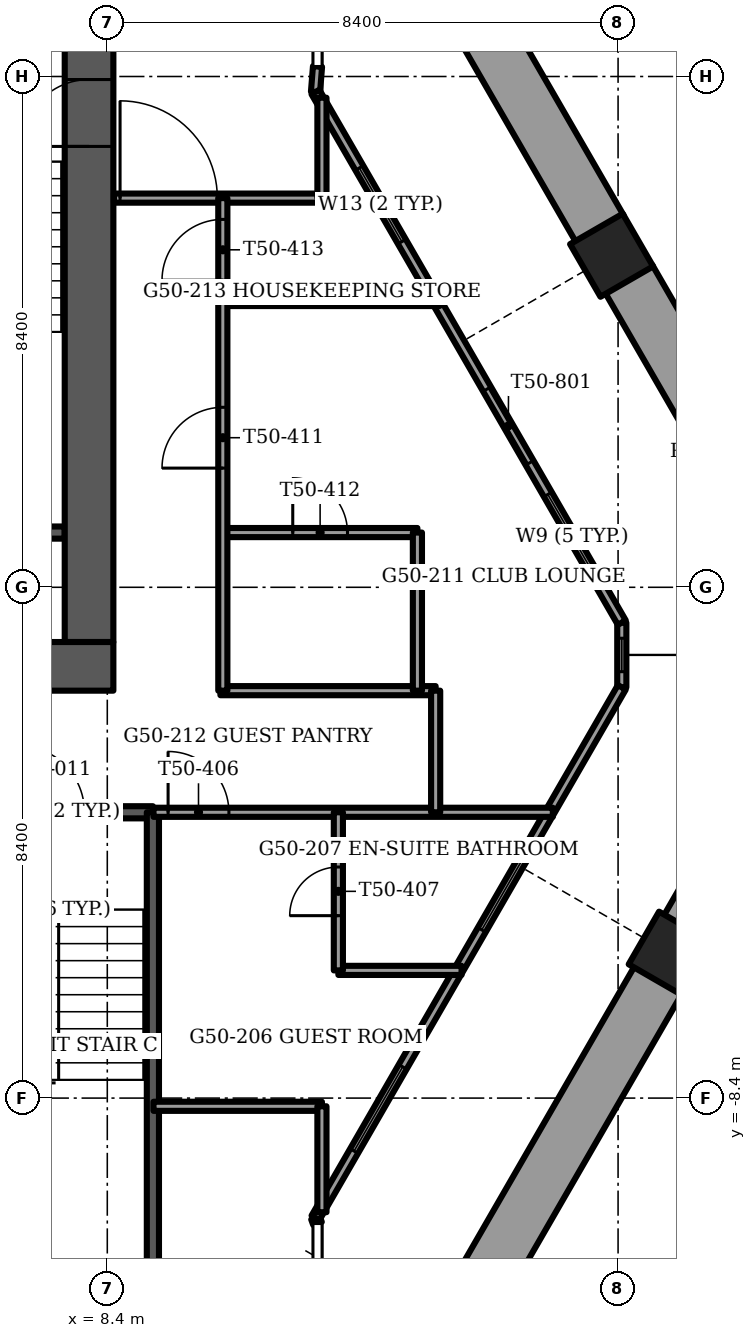
"""IFC4 building model, lengths in metres.
Left out: names, types, materials, properties, quantities, classifications, styles, units other than length and angle.
Written with IfcOpenShell. Run it as: python <this file> out.ifc"""

import sys

from ifc_helpers import new_model, si_unit, direction, frame, frame_2d, origin, origin_2d, place, context, subcontext, project, spatial, rectangle, extrude, element, fill, save


model = new_model("IFC4")
c1 = context("Model", 3, precision=1e-05, world=origin(), true_north=direction((0.0, 1.0)))
c2 = subcontext(c1, "Body", "Model", "MODEL_VIEW")
j1 = project(units=[si_unit("LENGTHUNIT", "METRE"), si_unit("PLANEANGLEUNIT", "RADIAN")], contexts=[c1])
p1 = place(None, origin())
s1 = spatial("IfcSite", under=j1, at=p1, CompositionType="ELEMENT")
p2 = place(p1, origin())
s2 = spatial("IfcBuilding", under=s1, at=p2, CompositionType="ELEMENT")
p3 = place(p2, frame((0.0, 0.0, 202.0)))
s3 = spatial("IfcBuildingStorey", under=s2, at=p3, CompositionType="ELEMENT", Elevation=202.0)
for number, where, z_axis, x_axis in (
    (1, (17.657, -6.017, -1.2), (0.0, 0.0, 1.0), (-0.5, -0.866, 0.0)),
    (2, (16.694, 5.46, -1.2), (0.0, 0.0, 1.0), (0.5, -0.866, 0.0)),
):
    element("IfcColumn", number, at=place(p3, frame(where, z_axis=z_axis, x_axis=x_axis)), inside=s3, PredefinedType="COLUMN", context=c2, shape_type="SweptSolid", body=[
        extrude(rectangle(XDim=1.0, YDim=1.0, at=origin_2d()), origin(), (0.0, 0.0, 1.0), 3.75),
    ])
p4 = place(p3, frame((-8.5, -1.3, -0.3), z_axis=(0.0, 0.0, 1.0), x_axis=(1.0, 0.0, 0.0)))
e3 = element("IfcWall", 3, at=p4, inside=s3, PredefinedType="SHEAR", context=c2, shape_type="SweptSolid", body=[
    extrude(rectangle(XDim=17.0, YDim=0.8, at=frame_2d((8.5, 0.0))), origin(), (0.0, 0.0, 1.0), 3.75),
])
p5 = place(p4, frame((7.7, 0.0, 0.0)))
e4 = element("IfcOpeningElement", 4, at=p5, cuts=e3, PredefinedType="OPENING", context=c2, shape_type="SweptSolid", body=[
    extrude(rectangle(XDim=1.6, YDim=2.1, at=frame_2d((0.8, 1.05))), frame((0.0, 0.4, 0.0), z_axis=(0.0, -1.0, 0.0), x_axis=(1.0, 0.0, 0.0)), (0.0, 0.0, 1.0), 0.8),
])
p6 = place(p3, frame((8.1, -0.9, -0.3), z_axis=(0.0, 0.0, 1.0), x_axis=(0.0, 1.0, 0.0)))
e5 = element("IfcWall", 5, at=p6, inside=s3, PredefinedType="SHEAR", context=c2, shape_type="SweptSolid", body=[
    extrude(rectangle(XDim=9.8, YDim=0.8, at=frame_2d((4.9, 0.0))), origin(), (0.0, 0.0, 1.0), 3.75),
])
p7 = place(p6, frame((8.15, 0.0, 0.0)))
e6 = element("IfcOpeningElement", 6, at=p7, cuts=e5, PredefinedType="OPENING", context=c2, shape_type="SweptSolid", body=[
    extrude(rectangle(XDim=1.1, YDim=2.1, at=frame_2d((0.55, 1.05))), frame((0.0, 0.4, 0.0), z_axis=(0.0, -1.0, 0.0), x_axis=(1.0, 0.0, 0.0)), (0.0, 0.0, 1.0), 0.8),
])
p8 = place(p3, frame((14.317, -11.901, 0.0), z_axis=(0.0, 0.0, 1.0), x_axis=(0.500013351051, 0.866017695414, 0.0)))
e7 = element("IfcWall", 7, at=p8, inside=s3, PredefinedType="PARAPET", context=c2, shape_type="SweptSolid", body=[
    extrude(rectangle(XDim=6.296, YDim=0.9, at=frame_2d((3.148, 0.0))), origin(), (0.0, 0.0, 1.0), 1.1),
])
p9 = place(p3, frame((17.936, -5.635, 0.0), z_axis=(0.0, 0.0, 1.0), x_axis=(0.500028081597, 0.86600919026, 0.0)))
e8 = element("IfcWall", 8, at=p9, inside=s3, PredefinedType="PARAPET", context=c2, shape_type="SweptSolid", body=[
    extrude(rectangle(XDim=4.679, YDim=0.9, at=frame_2d((2.339, 0.0))), origin(), (0.0, 0.0, 1.0), 1.1),
])
p10 = place(p3, frame((20.275, -0.643, 0.0), z_axis=(0.0, 0.0, 1.0), x_axis=(-0.500010360262, 0.866019422202, 0.0)))
e9 = element("IfcWall", 9, at=p10, inside=s3, PredefinedType="PARAPET", context=c2, shape_type="SweptSolid", body=[
    extrude(rectangle(XDim=6.606, YDim=0.9, at=frame_2d((3.303, 0.0))), origin(), (0.0, 0.0, 1.0), 1.1),
])
p11 = place(p3, frame((16.502, 5.892, 0.0), z_axis=(0.0, 0.0, 1.0), x_axis=(-0.500013351051, 0.866017695414, 0.0)))
e10 = element("IfcWall", 10, at=p11, inside=s3, PredefinedType="PARAPET", context=c2, shape_type="SweptSolid", body=[
    extrude(rectangle(XDim=6.296, YDim=0.9, at=frame_2d((3.148, 0.0))), origin(), (0.0, 0.0, 1.0), 1.1),
])
p12 = place(p3, frame((11.824, -10.37, 0.0), z_axis=(0.0, 0.0, 1.0), x_axis=(0.499993749393, 0.866029012544, 0.0)))
e11 = element("IfcWall", 11, at=p12, inside=s3, PredefinedType="SOLIDWALL", context=c2, shape_type="SweptSolid", body=[
    extrude(rectangle(XDim=10.075, YDim=0.15, at=frame_2d((5.038, 0.0))), origin(), (0.0, 0.0, 1.0), 3.45),
])
p13 = place(p12, frame((1.269, 0.0, 0.15)))
e12 = element("IfcOpeningElement", 12, at=p13, cuts=e11, PredefinedType="OPENING", context=c2, shape_type="SweptSolid", body=[
    extrude(rectangle(XDim=1.6, YDim=2.2, at=frame_2d((0.8, 1.1))), frame((0.0, 0.075, 0.0), z_axis=(0.0, -1.0, 0.0), x_axis=(1.0, 0.0, 0.0)), (0.0, 0.0, 1.0), 0.15),
])
p14 = place(p12, frame((5.469, 0.0, 0.15)))
e13 = element("IfcOpeningElement", 13, at=p14, cuts=e11, PredefinedType="OPENING", context=c2, shape_type="SweptSolid", body=[
    extrude(rectangle(XDim=1.6, YDim=2.2, at=frame_2d((0.8, 1.1))), frame((0.0, 0.075, 0.0), z_axis=(0.0, -1.0, 0.0), x_axis=(1.0, 0.0, 0.0)), (0.0, 0.0, 1.0), 0.15),
])
p15 = place(p3, frame((16.861, -0.58, 0.0), z_axis=(0.0, 0.0, 1.0), x_axis=(-0.499993749393, 0.866029012544, 0.0)))
e14 = element("IfcWall", 14, at=p15, inside=s3, PredefinedType="SOLIDWALL", context=c2, shape_type="SweptSolid", body=[
    extrude(rectangle(XDim=10.075, YDim=0.15, at=frame_2d((5.038, 0.0))), origin(), (0.0, 0.0, 1.0), 3.45),
])
p16 = place(p15, frame((0.833, 0.0, 0.15)))
e15 = element("IfcOpeningElement", 15, at=p16, cuts=e14, PredefinedType="OPENING", context=c2, shape_type="SweptSolid", body=[
    extrude(rectangle(XDim=1.6, YDim=2.2, at=frame_2d((0.8, 1.1))), frame((0.0, 0.075, 0.0), z_axis=(0.0, -1.0, 0.0), x_axis=(1.0, 0.0, 0.0)), (0.0, 0.0, 1.0), 0.15),
])
p17 = place(p15, frame((3.033, 0.0, 0.0)))
e16 = element("IfcOpeningElement", 16, at=p17, cuts=e14, PredefinedType="OPENING", context=c2, shape_type="SweptSolid", body=[
    extrude(rectangle(XDim=1.4, YDim=2.4, at=frame_2d((0.7, 1.2))), frame((0.0, 0.075, 0.0), z_axis=(0.0, -1.0, 0.0), x_axis=(1.0, 0.0, 0.0)), (0.0, 0.0, 1.0), 0.15),
])
p18 = place(p15, frame((7.233, 0.0, 0.15)))
e17 = element("IfcOpeningElement", 17, at=p18, cuts=e14, PredefinedType="OPENING", context=c2, shape_type="SweptSolid", body=[
    extrude(rectangle(XDim=1.4, YDim=2.2, at=frame_2d((0.7, 1.1))), frame((0.0, 0.075, 0.0), z_axis=(0.0, -1.0, 0.0), x_axis=(1.0, 0.0, 0.0)), (0.0, 0.0, 1.0), 0.15),
])
p19 = place(p3, frame((16.861, -1.645, 0.0), z_axis=(0.0, 0.0, 1.0), x_axis=(0.0, 1.0, 0.0)))
e18 = element("IfcWall", 18, at=p19, inside=s3, PredefinedType="SOLIDWALL", context=c2, shape_type="SweptSolid", body=[
    extrude(rectangle(XDim=1.065, YDim=0.15, at=frame_2d((0.532, 0.0))), origin(), (0.0, 0.0, 1.0), 3.45),
])
p20 = place(p19, frame((0.258, 0.0, 0.15)))
e19 = element("IfcOpeningElement", 19, at=p20, cuts=e18, PredefinedType="OPENING", context=c2, shape_type="SweptSolid", body=[
    extrude(rectangle(XDim=0.55, YDim=2.2, at=frame_2d((0.275, 1.1))), frame((0.0, 0.075, 0.0), z_axis=(0.0, -1.0, 0.0), x_axis=(1.0, 0.0, 0.0)), (0.0, 0.0, 1.0), 0.15),
])
p21 = place(p3, frame((11.824, -10.37, 0.0), z_axis=(0.0, 0.0, 1.0), x_axis=(0.338543167143, -0.940950861619, 0.0)))
e20 = element("IfcWall", 20, at=p21, inside=s3, PredefinedType="SOLIDWALL", context=c2, shape_type="SweptSolid", body=[
    extrude(rectangle(XDim=0.098, YDim=0.15, at=frame_2d((0.049, 0.0))), origin(), (0.0, 0.0, 1.0), 3.45),
])
p22 = place(p3, frame((11.824, 8.145, 0.0), z_axis=(0.0, 0.0, 1.0), x_axis=(0.078869316502, 0.996884963732, 0.0)))
e21 = element("IfcWall", 21, at=p22, inside=s3, PredefinedType="SOLIDWALL", context=c2, shape_type="SweptSolid", body=[
    extrude(rectangle(XDim=0.421, YDim=0.15, at=frame_2d((0.21, 0.0))), origin(), (0.0, 0.0, 1.0), 3.45),
])
p23 = place(p3, frame((4.45, 0.9, -0.3), z_axis=(0.0, 0.0, 1.0), x_axis=(1.0, 0.0, 0.0)))
e22 = element("IfcWall", 22, at=p23, inside=s3, PredefinedType="SOLIDWALL", context=c2, shape_type="SweptSolid", body=[
    extrude(rectangle(XDim=3.25, YDim=0.2, at=frame_2d((1.625, 0.0))), origin(), (0.0, 0.0, 1.0), 3.75),
])
p24 = place(p3, frame((5.8, -3.7, -0.3), z_axis=(0.0, 0.0, 1.0), x_axis=(1.0, 0.0, 0.0)))
e23 = element("IfcWall", 23, at=p24, inside=s3, PredefinedType="SOLIDWALL", context=c2, shape_type="SweptSolid", body=[
    extrude(rectangle(XDim=3.35, YDim=0.2, at=frame_2d((1.675, 0.0))), origin(), (0.0, 0.0, 1.0), 3.75),
])
p25 = place(p24, frame((1.125, 0.0, 0.0)))
e24 = element("IfcOpeningElement", 24, at=p25, cuts=e23, PredefinedType="OPENING", context=c2, shape_type="SweptSolid", body=[
    extrude(rectangle(XDim=1.1, YDim=2.1, at=frame_2d((0.55, 1.05))), frame((0.0, 0.1, 0.0), z_axis=(0.0, -1.0, 0.0), x_axis=(1.0, 0.0, 0.0)), (0.0, 0.0, 1.0), 0.2),
])
p26 = place(p3, frame((9.15, -3.7, -0.3), z_axis=(0.0, 0.0, 1.0), x_axis=(0.0, -1.0, 0.0)))
e25 = element("IfcWall", 25, at=p26, inside=s3, PredefinedType="SOLIDWALL", context=c2, shape_type="SweptSolid", body=[
    extrude(rectangle(XDim=7.7, YDim=0.2, at=frame_2d((3.85, 0.0))), origin(), (0.0, 0.0, 1.0), 3.75),
])
p27 = place(p3, frame((9.16, -8.535, 0.0), z_axis=(0.0, 0.0, 1.0), x_axis=(1.0, 0.0, 0.0)))
e26 = element("IfcWall", 26, at=p27, inside=s3, PredefinedType="PARTITIONING", context=c2, shape_type="SweptSolid", body=[
    extrude(rectangle(XDim=2.77, YDim=0.15, at=frame_2d((1.385, 0.0))), origin(), (0.0, 0.0, 1.0), 3.45),
])
p28 = place(p3, frame((12.2, -6.3, 0.0), z_axis=(0.0, 0.0, 1.0), x_axis=(1.0, 0.0, 0.0)))
e27 = element("IfcWall", 27, at=p28, inside=s3, PredefinedType="PARTITIONING", context=c2, shape_type="SweptSolid", body=[
    extrude(rectangle(XDim=2.026, YDim=0.15, at=frame_2d((1.013, 0.0))), origin(), (0.0, 0.0, 1.0), 3.45),
])
p29 = place(p3, frame((9.16, -3.7, 0.0), z_axis=(0.0, 0.0, 1.0), x_axis=(1.0, 0.0, 0.0)))
e28 = element("IfcWall", 28, at=p29, inside=s3, PredefinedType="PARTITIONING", context=c2, shape_type="SweptSolid", body=[
    extrude(rectangle(XDim=6.567, YDim=0.15, at=frame_2d((3.284, 0.0))), origin(), (0.0, 0.0, 1.0), 3.45),
])
p30 = place(p29, frame((0.24, 0.0, 0.0)))
e29 = element("IfcOpeningElement", 29, at=p30, cuts=e28, PredefinedType="OPENING", context=c2, shape_type="SweptSolid", body=[
    extrude(rectangle(XDim=1.0, YDim=2.1, at=frame_2d((0.5, 1.05))), frame((0.0, 0.075, 0.0), z_axis=(0.0, -1.0, 0.0), x_axis=(1.0, 0.0, 0.0)), (0.0, 0.0, 1.0), 0.15),
])
p31 = place(p3, frame((10.26, -1.7, 0.0), z_axis=(0.0, 0.0, 1.0), x_axis=(1.0, 0.0, 0.0)))
e30 = element("IfcWall", 30, at=p31, inside=s3, PredefinedType="PARTITIONING", context=c2, shape_type="SweptSolid", body=[
    extrude(rectangle(XDim=3.54, YDim=0.15, at=frame_2d((1.77, 0.0))), origin(), (0.0, 0.0, 1.0), 3.45),
])
p32 = place(p3, frame((10.3, 0.9, 0.0), z_axis=(0.0, 0.0, 1.0), x_axis=(1.0, 0.0, 0.0)))
e31 = element("IfcWall", 31, at=p32, inside=s3, PredefinedType="PARTITIONING", context=c2, shape_type="SweptSolid", body=[
    extrude(rectangle(XDim=3.2, YDim=0.15, at=frame_2d((1.6, 0.0))), origin(), (0.0, 0.0, 1.0), 3.45),
])
p33 = place(p32, frame((1.15, 0.0, 0.0)))
e32 = element("IfcOpeningElement", 32, at=p33, cuts=e31, PredefinedType="OPENING", context=c2, shape_type="SweptSolid", body=[
    extrude(rectangle(XDim=0.9, YDim=2.1, at=frame_2d((0.45, 1.05))), frame((0.0, 0.075, 0.0), z_axis=(0.0, -1.0, 0.0), x_axis=(1.0, 0.0, 0.0)), (0.0, 0.0, 1.0), 0.15),
])
p34 = place(p3, frame((10.3, 4.7, 0.0), z_axis=(0.0, 0.0, 1.0), x_axis=(1.0, 0.0, 0.0)))
e33 = element("IfcWall", 33, at=p34, inside=s3, PredefinedType="PARTITIONING", context=c2, shape_type="SweptSolid", body=[
    extrude(rectangle(XDim=3.565, YDim=0.15, at=frame_2d((1.782, 0.0))), origin(), (0.0, 0.0, 1.0), 3.45),
])
p35 = place(p3, frame((8.51, 6.4, 0.0), z_axis=(0.0, 0.0, 1.0), x_axis=(1.0, 0.0, 0.0)))
e34 = element("IfcWall", 34, at=p35, inside=s3, PredefinedType="PARTITIONING", context=c2, shape_type="SweptSolid", body=[
    extrude(rectangle(XDim=3.42, YDim=0.15, at=frame_2d((1.71, 0.0))), origin(), (0.0, 0.0, 1.0), 3.45),
])
p36 = place(p35, frame((0.1, 0.0, 0.0)))
e35 = element("IfcOpeningElement", 35, at=p36, cuts=e34, PredefinedType="OPENING", context=c2, shape_type="SweptSolid", body=[
    extrude(rectangle(XDim=1.6, YDim=2.1, at=frame_2d((0.8, 1.05))), frame((0.0, 0.075, 0.0), z_axis=(0.0, -1.0, 0.0), x_axis=(1.0, 0.0, 0.0)), (0.0, 0.0, 1.0), 0.15),
])
p37 = place(p3, frame((13.8, -3.7, 0.0), z_axis=(0.0, 0.0, 1.0), x_axis=(0.0, 1.0, 0.0)))
e36 = element("IfcWall", 36, at=p37, inside=s3, PredefinedType="PARTITIONING", context=c2, shape_type="SweptSolid", body=[
    extrude(rectangle(XDim=2.0, YDim=0.15, at=frame_2d((1.0, 0.0))), origin(), (0.0, 0.0, 1.0), 3.45),
])
p38 = place(p3, frame((13.5, -1.7, 0.0), z_axis=(0.0, 0.0, 1.0), x_axis=(0.0, 1.0, 0.0)))
e37 = element("IfcWall", 37, at=p38, inside=s3, PredefinedType="PARTITIONING", context=c2, shape_type="SweptSolid", body=[
    extrude(rectangle(XDim=2.6, YDim=0.15, at=frame_2d((1.3, 0.0))), origin(), (0.0, 0.0, 1.0), 3.45),
])
p39 = place(p3, frame((12.2, -6.3, 0.0), z_axis=(0.0, 0.0, 1.0), x_axis=(0.0, 1.0, 0.0)))
e38 = element("IfcWall", 38, at=p39, inside=s3, PredefinedType="PARTITIONING", context=c2, shape_type="SweptSolid", body=[
    extrude(rectangle(XDim=2.6, YDim=0.15, at=frame_2d((1.3, 0.0))), origin(), (0.0, 0.0, 1.0), 3.45),
])
p40 = place(p39, frame((0.9, 0.0, 0.0)))
e39 = element("IfcOpeningElement", 39, at=p40, cuts=e38, PredefinedType="OPENING", context=c2, shape_type="SweptSolid", body=[
    extrude(rectangle(XDim=0.8, YDim=2.1, at=frame_2d((0.4, 1.05))), frame((0.0, 0.075, 0.0), z_axis=(0.0, -1.0, 0.0), x_axis=(1.0, 0.0, 0.0)), (0.0, 0.0, 1.0), 0.15),
])
p41 = place(p3, frame((11.93, -10.277, 0.0), z_axis=(0.0, 0.0, 1.0), x_axis=(0.0, 1.0, 0.0)))
e40 = element("IfcWall", 40, at=p41, inside=s3, PredefinedType="PARTITIONING", context=c2, shape_type="SweptSolid", body=[
    extrude(rectangle(XDim=1.742, YDim=0.15, at=frame_2d((0.871, 0.0))), origin(), (0.0, 0.0, 1.0), 3.45),
])
p42 = place(p3, frame((11.93, 6.4, 0.0), z_axis=(0.0, 0.0, 1.0), x_axis=(0.0, 1.0, 0.0)))
e41 = element("IfcWall", 41, at=p42, inside=s3, PredefinedType="PARTITIONING", context=c2, shape_type="SweptSolid", body=[
    extrude(rectangle(XDim=1.651, YDim=0.15, at=frame_2d((0.826, 0.0))), origin(), (0.0, 0.0, 1.0), 3.45),
])
p43 = place(p3, frame((10.3, -1.7, 0.0), z_axis=(0.0, 0.0, 1.0), x_axis=(0.0, 1.0, 0.0)))
e42 = element("IfcWall", 42, at=p43, inside=s3, PredefinedType="PARTITIONING", context=c2, shape_type="SweptSolid", body=[
    extrude(rectangle(XDim=8.1, YDim=0.15, at=frame_2d((4.05, 0.0))), origin(), (0.0, 0.0, 1.0), 3.45),
])
p44 = place(p43, frame((3.66, 0.0, 0.0)))
e43 = element("IfcOpeningElement", 43, at=p44, cuts=e42, PredefinedType="OPENING", context=c2, shape_type="SweptSolid", body=[
    extrude(rectangle(XDim=1.0, YDim=2.1, at=frame_2d((0.5, 1.05))), frame((0.0, 0.075, 0.0), z_axis=(0.0, -1.0, 0.0), x_axis=(1.0, 0.0, 0.0)), (0.0, 0.0, 1.0), 0.15),
])
p45 = place(p43, frame((6.75, 0.0, 0.0)))
e44 = element("IfcOpeningElement", 44, at=p45, cuts=e42, PredefinedType="OPENING", context=c2, shape_type="SweptSolid", body=[
    extrude(rectangle(XDim=1.0, YDim=2.1, at=frame_2d((0.5, 1.05))), frame((0.0, 0.075, 0.0), z_axis=(0.0, -1.0, 0.0), x_axis=(1.0, 0.0, 0.0)), (0.0, 0.0, 1.0), 0.15),
])
p46 = place(p13, origin())
e45 = element("IfcWindow", 45, at=p46, inside=s3, PartitioningType="SINGLE_PANEL", PredefinedType="WINDOW", context=c2, shape_type="SweptSolid", body=[
    extrude(rectangle(XDim=1.6, YDim=2.2, at=frame_2d((0.8, 1.1))), frame((0.0, 0.03, 0.0), z_axis=(0.0, -1.0, 0.0), x_axis=(1.0, 0.0, 0.0)), (0.0, 0.0, 1.0), 0.06),
])
fill(e12, e45)
p47 = place(p14, origin())
e46 = element("IfcWindow", 46, at=p47, inside=s3, PartitioningType="SINGLE_PANEL", PredefinedType="WINDOW", context=c2, shape_type="SweptSolid", body=[
    extrude(rectangle(XDim=1.6, YDim=2.2, at=frame_2d((0.8, 1.1))), frame((0.0, 0.03, 0.0), z_axis=(0.0, -1.0, 0.0), x_axis=(1.0, 0.0, 0.0)), (0.0, 0.0, 1.0), 0.06),
])
fill(e13, e46)
p48 = place(p16, origin())
e47 = element("IfcWindow", 47, at=p48, inside=s3, PartitioningType="SINGLE_PANEL", PredefinedType="WINDOW", context=c2, shape_type="SweptSolid", body=[
    extrude(rectangle(XDim=1.6, YDim=2.2, at=frame_2d((0.8, 1.1))), frame((0.0, 0.03, 0.0), z_axis=(0.0, -1.0, 0.0), x_axis=(1.0, 0.0, 0.0)), (0.0, 0.0, 1.0), 0.06),
])
fill(e15, e47)
p49 = place(p17, origin())
e48 = element("IfcDoor", 48, at=p49, inside=s3, OperationType="SLIDING_TO_LEFT", PredefinedType="DOOR", context=c2, shape_type="SweptSolid", body=[
    extrude(rectangle(XDim=1.4, YDim=2.4, at=frame_2d((0.7, 1.2))), frame((0.0, 0.025, 0.0), z_axis=(0.0, -1.0, 0.0), x_axis=(1.0, 0.0, 0.0)), (0.0, 0.0, 1.0), 0.05),
])
fill(e16, e48)
p50 = place(p18, origin())
e49 = element("IfcWindow", 49, at=p50, inside=s3, PartitioningType="SINGLE_PANEL", PredefinedType="WINDOW", context=c2, shape_type="SweptSolid", body=[
    extrude(rectangle(XDim=1.4, YDim=2.2, at=frame_2d((0.7, 1.1))), frame((0.0, 0.03, 0.0), z_axis=(0.0, -1.0, 0.0), x_axis=(1.0, 0.0, 0.0)), (0.0, 0.0, 1.0), 0.06),
])
fill(e17, e49)
p51 = place(p20, origin())
e50 = element("IfcWindow", 50, at=p51, inside=s3, PartitioningType="SINGLE_PANEL", PredefinedType="WINDOW", context=c2, shape_type="SweptSolid", body=[
    extrude(rectangle(XDim=0.55, YDim=2.2, at=frame_2d((0.275, 1.1))), frame((0.0, 0.03, 0.0), z_axis=(0.0, -1.0, 0.0), x_axis=(1.0, 0.0, 0.0)), (0.0, 0.0, 1.0), 0.06),
])
fill(e19, e50)
p52 = place(p7, origin())
e51 = element("IfcDoor", 51, at=p52, inside=s3, OperationType="SINGLE_SWING_LEFT", PredefinedType="DOOR", context=c2, shape_type="SweptSolid", body=[
    extrude(rectangle(XDim=1.1, YDim=2.1, at=frame_2d((0.55, 1.05))), frame((0.0, 0.025, 0.0), z_axis=(0.0, -1.0, 0.0), x_axis=(1.0, 0.0, 0.0)), (0.0, 0.0, 1.0), 0.05),
])
fill(e6, e51)
p53 = place(p25, origin())
e52 = element("IfcDoor", 52, at=p53, inside=s3, OperationType="SINGLE_SWING_LEFT", PredefinedType="DOOR", context=c2, shape_type="SweptSolid", body=[
    extrude(rectangle(XDim=1.1, YDim=2.1, at=frame_2d((0.55, 1.05))), frame((0.0, 0.025, 0.0), z_axis=(0.0, -1.0, 0.0), x_axis=(1.0, 0.0, 0.0)), (0.0, 0.0, 1.0), 0.05),
])
fill(e24, e52)
p54 = place(p30, origin())
e53 = element("IfcDoor", 53, at=p54, inside=s3, OperationType="SINGLE_SWING_LEFT", PredefinedType="DOOR", context=c2, shape_type="SweptSolid", body=[
    extrude(rectangle(XDim=1.0, YDim=2.1, at=frame_2d((0.5, 1.05))), frame((0.0, 0.025, 0.0), z_axis=(0.0, -1.0, 0.0), x_axis=(1.0, 0.0, 0.0)), (0.0, 0.0, 1.0), 0.05),
])
fill(e29, e53)
p55 = place(p40, origin())
e54 = element("IfcDoor", 54, at=p55, inside=s3, OperationType="SINGLE_SWING_RIGHT", PredefinedType="DOOR", context=c2, shape_type="SweptSolid", body=[
    extrude(rectangle(XDim=0.8, YDim=2.1, at=frame_2d((0.4, 1.05))), frame((0.0, 0.025, 0.0), z_axis=(0.0, -1.0, 0.0), x_axis=(1.0, 0.0, 0.0)), (0.0, 0.0, 1.0), 0.05),
])
fill(e39, e54)
p56 = place(p44, origin())
e55 = element("IfcDoor", 55, at=p56, inside=s3, OperationType="SINGLE_SWING_RIGHT", PredefinedType="DOOR", context=c2, shape_type="SweptSolid", body=[
    extrude(rectangle(XDim=1.0, YDim=2.1, at=frame_2d((0.5, 1.05))), frame((0.0, 0.025, 0.0), z_axis=(0.0, -1.0, 0.0), x_axis=(1.0, 0.0, 0.0)), (0.0, 0.0, 1.0), 0.05),
])
fill(e43, e55)
p57 = place(p33, origin())
e56 = element("IfcDoor", 56, at=p57, inside=s3, OperationType="SINGLE_SWING_LEFT", PredefinedType="DOOR", context=c2, shape_type="SweptSolid", body=[
    extrude(rectangle(XDim=0.9, YDim=2.1, at=frame_2d((0.45, 1.05))), frame((0.0, 0.025, 0.0), z_axis=(0.0, -1.0, 0.0), x_axis=(1.0, 0.0, 0.0)), (0.0, 0.0, 1.0), 0.05),
])
fill(e32, e56)
p58 = place(p45, origin())
e57 = element("IfcDoor", 57, at=p58, inside=s3, OperationType="SINGLE_SWING_LEFT", PredefinedType="DOOR", context=c2, shape_type="SweptSolid", body=[
    extrude(rectangle(XDim=1.0, YDim=2.1, at=frame_2d((0.5, 1.05))), frame((0.0, 0.025, 0.0), z_axis=(0.0, -1.0, 0.0), x_axis=(1.0, 0.0, 0.0)), (0.0, 0.0, 1.0), 0.05),
])
fill(e44, e57)
p59 = place(p36, origin())
e58 = element("IfcDoor", 58, at=p59, inside=s3, OperationType="DOUBLE_DOOR_SINGLE_SWING", PredefinedType="DOOR", context=c2, shape_type="SweptSolid", body=[
    extrude(rectangle(XDim=1.6, YDim=2.1, at=frame_2d((0.8, 1.05))), frame((0.0, 0.025, 0.0), z_axis=(0.0, -1.0, 0.0), x_axis=(1.0, 0.0, 0.0)), (0.0, 0.0, 1.0), 0.05),
])
fill(e35, e58)
save(model, sys.argv[1])
